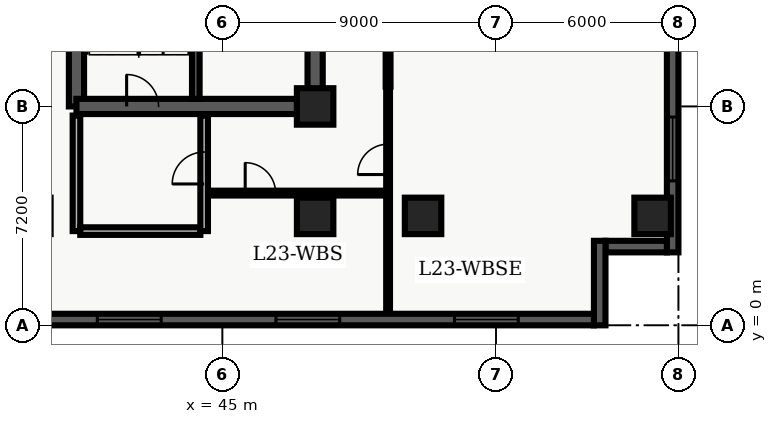
"""IFC4 building model, lengths in metres.
Left out: names, types, materials, properties, quantities, classifications, styles, units other than length and angle.
Written with IfcOpenShell. Run it as: python <this file> out.ifc"""

import sys

from ifc_helpers import new_model, entity, si_unit, converted_unit, direction, frame, origin_with_axes, origin_2d_with_axis, place, context, subcontext, project, spatial, polyline, rectangle, outline, extrude, element, fill, save


model = new_model("IFC4")
c1 = context("Model", 3, precision=1e-05, world=origin_with_axes(), true_north=direction((0.0, 1.0)))
c2 = subcontext(c1, "Body", "Model", "MODEL_VIEW")
j1 = project(units=[si_unit("LENGTHUNIT", "METRE"), converted_unit("PLANEANGLEUNIT", "DEGREE", entity("IfcPlaneAngleMeasure", 0.017), si_unit("PLANEANGLEUNIT", "RADIAN"), dimensions=[0, 0, 0, 0, 0, 0, 0])], contexts=[c1])
p1 = place(None, origin_with_axes())
s1 = spatial("IfcSite", under=j1, at=p1, CompositionType="ELEMENT")
p2 = place(p1, origin_with_axes())
s2 = spatial("IfcBuilding", under=s1, at=p2, CompositionType="ELEMENT")
p3 = place(p2, frame((0.0, 0.0, 96.9), z_axis=(0.0, 0.0, 1.0), x_axis=(1.0, 0.0, 0.0)))
s3 = spatial("IfcBuildingStorey", under=s2, at=p3, CompositionType="ELEMENT", Elevation=96.9)
p4 = place(p3, frame((40.2, 7.2, 0.0), z_axis=(0.0, 0.0, 1.0), x_axis=(0.0, 1.0, 0.0)))
e1 = element("IfcWall", 1, at=p4, inside=s3, PredefinedType="SHEAR", context=c2, shape_type="SweptSolid", body=[
    extrude(outline(polyline([(0.0, -0.25), (15.6, -0.25), (15.6, 0.25), (0.0, 0.25), (0.0, -0.25)])), origin_with_axes(), (0.0, 0.0, 1.0), 3.66),
])
p5 = place(p4, frame((12.75, 0.0, 0.0), z_axis=(0.0, 0.0, 1.0), x_axis=(1.0, 0.0, 0.0)))
e2 = element("IfcOpeningElement", 2, at=p5, cuts=e1, PredefinedType="OPENING", context=c2, shape_type="SweptSolid", body=[
    extrude(rectangle(XDim=1.2, YDim=0.52, at=origin_2d_with_axis()), origin_with_axes(), (0.0, 0.0, 1.0), 2.15),
])
p6 = place(p3, frame((40.2, 7.2, 0.0), z_axis=(0.0, 0.0, 1.0), x_axis=(1.0, 0.0, 0.0)))
e3 = element("IfcWall", 3, at=p6, inside=s3, PredefinedType="SHEAR", context=c2, shape_type="SweptSolid", body=[
    extrude(outline(polyline([(0.0, -0.25), (7.85, -0.25), (7.85, 0.25), (0.0, 0.25), (0.0, -0.25)])), origin_with_axes(), (0.0, 0.0, 1.0), 3.66),
])
p7 = place(p6, frame((2.175, 0.0, 0.0), z_axis=(0.0, 0.0, 1.0), x_axis=(1.0, 0.0, 0.0)))
e4 = element("IfcOpeningElement", 4, at=p7, cuts=e3, PredefinedType="OPENING", context=c2, shape_type="SweptSolid", body=[
    extrude(rectangle(XDim=1.05, YDim=0.52, at=origin_2d_with_axis()), origin_with_axes(), (0.0, 0.0, 1.0), 2.15),
])
p8 = place(p3, frame((48.05, 7.2, 0.0), z_axis=(0.0, 0.0, 1.0), x_axis=(0.0, 1.0, 0.0)))
e5 = element("IfcWall", 5, at=p8, inside=s3, PredefinedType="SHEAR", context=c2, shape_type="SweptSolid", body=[
    extrude(outline(polyline([(0.0, -0.25), (15.6, -0.25), (15.6, 0.25), (0.0, 0.25), (0.0, -0.25)])), origin_with_axes(), (0.0, 0.0, 1.0), 3.66),
])
p9 = place(p8, frame((2.725, 0.0, 0.0), z_axis=(0.0, 0.0, 1.0), x_axis=(1.0, 0.0, 0.0)))
e6 = element("IfcOpeningElement", 6, at=p9, cuts=e5, PredefinedType="OPENING", context=c2, shape_type="SweptSolid", body=[
    extrude(rectangle(XDim=0.95, YDim=0.52, at=origin_2d_with_axis()), origin_with_axes(), (0.0, 0.0, 1.0), 2.15),
])
p10 = place(p8, frame((5.675, 0.0, 0.0), z_axis=(0.0, 0.0, 1.0), x_axis=(1.0, 0.0, 0.0)))
e7 = element("IfcOpeningElement", 7, at=p10, cuts=e5, PredefinedType="OPENING", context=c2, shape_type="SweptSolid", body=[
    extrude(rectangle(XDim=0.95, YDim=0.52, at=origin_2d_with_axis()), origin_with_axes(), (0.0, 0.0, 1.0), 2.15),
])
p11 = place(p3, frame((44.125, 7.45, 0.0), z_axis=(0.0, 0.0, 1.0), x_axis=(0.0, 1.0, 0.0)))
e8 = element("IfcWall", 8, at=p11, inside=s3, PredefinedType="SHEAR", context=c2, shape_type="SweptSolid", body=[
    extrude(outline(polyline([(0.0, -0.125), (15.1, -0.125), (15.1, 0.125), (0.0, 0.125), (0.0, -0.125)])), origin_with_axes(), (0.0, 0.0, 1.0), 3.66),
])
p12 = place(p3, frame((40.2, 3.1, 0.0), z_axis=(0.0, 0.0, 1.0), x_axis=(0.0, 1.0, 0.0)))
e9 = element("IfcWall", 9, at=p12, inside=s3, PredefinedType="SOLIDWALL", context=c2, shape_type="SweptSolid", body=[
    extrude(outline(polyline([(0.0, -0.125), (3.8, -0.125), (3.8, 0.125), (0.0, 0.125), (0.0, -0.125)])), origin_with_axes(), (0.0, 0.0, 1.0), 2.7),
])
p13 = place(p3, frame((40.325, 3.1, 0.0), z_axis=(0.0, 0.0, 1.0), x_axis=(1.0, 0.0, 0.0)))
e10 = element("IfcWall", 10, at=p13, inside=s3, PredefinedType="SOLIDWALL", context=c2, shape_type="SweptSolid", body=[
    extrude(outline(polyline([(0.0, -0.125), (3.95, -0.125), (3.95, 0.125), (0.0, 0.125), (0.0, -0.125)])), origin_with_axes(), (0.0, 0.0, 1.0), 2.7),
])
p14 = place(p3, frame((44.4, 3.1, 0.0), z_axis=(0.0, 0.0, 1.0), x_axis=(0.0, 1.0, 0.0)))
e11 = element("IfcWall", 11, at=p14, inside=s3, PredefinedType="SOLIDWALL", context=c2, shape_type="SweptSolid", body=[
    extrude(outline(polyline([(0.0, -0.125), (3.8, -0.125), (3.8, 0.125), (0.0, 0.125), (0.0, -0.125)])), origin_with_axes(), (0.0, 0.0, 1.0), 2.7),
])
p15 = place(p14, frame((2.075, 0.0, 0.0), z_axis=(0.0, 0.0, 1.0), x_axis=(1.0, 0.0, 0.0)))
e12 = element("IfcOpeningElement", 12, at=p15, cuts=e11, PredefinedType="OPENING", context=c2, shape_type="SweptSolid", body=[
    extrude(rectangle(XDim=1.05, YDim=0.27, at=origin_2d_with_axis()), origin_with_axes(), (0.0, 0.0, 1.0), 2.15),
])
for number, where, z_axis, x_axis in (
    (13, (48.05, 3.6, 0.0), (0.0, 0.0, 1.0), (1.0, 0.0, 0.0)),
    (14, (48.05, 7.2, 0.0), (0.0, 0.0, 1.0), (1.0, 0.0, 0.0)),
    (15, (51.6, 3.6, 0.0), (0.0, 0.0, 1.0), (1.0, 0.0, 0.0)),
    (16, (59.15, 3.6, 0.0), (0.0, 0.0, 1.0), (1.0, 0.0, 0.0)),
):
    element("IfcColumn", number, at=place(p3, frame(where, z_axis=z_axis, x_axis=x_axis)), inside=s3, PredefinedType="COLUMN", context=c2, shape_type="SweptSolid", body=[
        extrude(rectangle(XDim=1.2, YDim=1.2, at=origin_2d_with_axis()), origin_with_axes(), (0.0, 0.0, 1.0), 3.9),
    ])
p16 = place(p3, frame((50.45, 7.85, 0.0), z_axis=(0.0, 0.0, 1.0), x_axis=(0.0, 1.0, 0.0)))
e17 = element("IfcWall", 17, at=p16, inside=s3, PredefinedType="PARTITIONING", context=c2, shape_type="SweptSolid", body=[
    extrude(outline(polyline([(0.0, -0.08), (18.8, -0.08), (18.8, 0.08), (0.0, 0.08), (0.0, -0.08)])), origin_with_axes(), (0.0, 0.0, 1.0), 2.7),
])
p17 = place(p16, frame((5.84, 0.0, 0.0), z_axis=(0.0, 0.0, 1.0), x_axis=(1.0, 0.0, 0.0)))
e18 = element("IfcOpeningElement", 18, at=p17, cuts=e17, PredefinedType="OPENING", context=c2, shape_type="SweptSolid", body=[
    extrude(rectangle(XDim=1.0, YDim=0.18, at=origin_2d_with_axis()), origin_with_axes(), (0.0, 0.0, 1.0), 2.15),
])
p18 = place(p16, frame((11.663, 0.0, 0.0), z_axis=(0.0, 0.0, 1.0), x_axis=(1.0, 0.0, 0.0)))
e19 = element("IfcOpeningElement", 19, at=p18, cuts=e17, PredefinedType="OPENING", context=c2, shape_type="SweptSolid", body=[
    extrude(rectangle(XDim=1.0, YDim=0.18, at=origin_2d_with_axis()), origin_with_axes(), (0.0, 0.0, 1.0), 2.15),
])
p19 = place(p16, frame((14.169, 0.0, 0.0), z_axis=(0.0, 0.0, 1.0), x_axis=(1.0, 0.0, 0.0)))
e20 = element("IfcOpeningElement", 20, at=p19, cuts=e17, PredefinedType="OPENING", context=c2, shape_type="SweptSolid", body=[
    extrude(rectangle(XDim=1.0, YDim=0.18, at=origin_2d_with_axis()), origin_with_axes(), (0.0, 0.0, 1.0), 2.15),
])
p20 = place(p3, frame((44.55, 4.35, 0.0), z_axis=(0.0, 0.0, 1.0), x_axis=(1.0, 0.0, 0.0)))
e21 = element("IfcWall", 21, at=p20, inside=s3, PredefinedType="PARTITIONING", context=c2, shape_type="SweptSolid", body=[
    extrude(outline(polyline([(0.0, -0.08), (5.9, -0.08), (5.9, 0.08), (0.0, 0.08), (0.0, -0.08)])), origin_with_axes(), (0.0, 0.0, 1.0), 2.7),
])
p21 = place(p20, frame((1.7, 0.0, 0.0), z_axis=(0.0, 0.0, 1.0), x_axis=(1.0, 0.0, 0.0)))
e22 = element("IfcOpeningElement", 22, at=p21, cuts=e21, PredefinedType="OPENING", context=c2, shape_type="SweptSolid", body=[
    extrude(rectangle(XDim=1.0, YDim=0.18, at=origin_2d_with_axis()), origin_with_axes(), (0.0, 0.0, 1.0), 2.15),
])
p22 = place(p3, frame((50.45, 0.36, 0.0), z_axis=(0.0, 0.0, 1.0), x_axis=(0.0, 1.0, 0.0)))
e23 = element("IfcWall", 23, at=p22, inside=s3, PredefinedType="PARTITIONING", context=c2, shape_type="SweptSolid", body=[
    extrude(outline(polyline([(0.0, -0.062), (7.49, -0.062), (7.49, 0.062), (0.0, 0.062), (0.0, -0.062)])), origin_with_axes(), (0.0, 0.0, 1.0), 2.7),
])
p23 = place(p22, frame((5.1, 0.0, 0.0), z_axis=(0.0, 0.0, 1.0), x_axis=(1.0, 0.0, 0.0)))
e24 = element("IfcOpeningElement", 24, at=p23, cuts=e23, PredefinedType="OPENING", context=c2, shape_type="SweptSolid", body=[
    extrude(rectangle(XDim=1.0, YDim=0.145, at=origin_2d_with_axis()), origin_with_axes(), (0.0, 0.0, 1.0), 2.15),
])
p24 = place(p3, frame((59.81, 26.02, 0.0), z_axis=(0.0, 0.0, 1.0), x_axis=(0.0, -1.0, 0.0)))
e25 = element("IfcWall", 25, at=p24, inside=s3, PredefinedType="SOLIDWALL", context=c2, shape_type="SweptSolid", body=[
    extrude(outline(polyline([(0.0, -0.19), (23.62, -0.19), (23.62, 0.19), (0.0, 0.19), (0.0, -0.19)])), origin_with_axes(), (0.0, 0.0, 1.0), 3.66),
])
p25 = place(p24, frame((20.218, 0.0, 0.45), z_axis=(0.0, 0.0, 1.0), x_axis=(1.0, 0.0, 0.0)))
e26 = element("IfcOpeningElement", 26, at=p25, cuts=e25, PredefinedType="OPENING", context=c2, shape_type="SweptSolid", body=[
    extrude(rectangle(XDim=2.1, YDim=0.4, at=origin_2d_with_axis()), origin_with_axes(), (0.0, 0.0, 1.0), 2.2),
])
p26 = place(p3, frame((59.62, 2.59, 0.0), z_axis=(0.0, 0.0, 1.0), x_axis=(-1.0, 0.0, 0.0)))
e27 = element("IfcWall", 27, at=p26, inside=s3, PredefinedType="SOLIDWALL", context=c2, shape_type="SweptSolid", body=[
    extrude(outline(polyline([(0.0, -0.19), (2.02, -0.19), (2.02, 0.19), (0.0, 0.19), (0.0, -0.19)])), origin_with_axes(), (0.0, 0.0, 1.0), 3.66),
])
p27 = place(p3, frame((57.41, 2.78, 0.0), z_axis=(0.0, 0.0, 1.0), x_axis=(0.0, -1.0, 0.0)))
e28 = element("IfcWall", 28, at=p27, inside=s3, PredefinedType="SOLIDWALL", context=c2, shape_type="SweptSolid", body=[
    extrude(outline(polyline([(0.0, -0.19), (2.78, -0.19), (2.78, 0.19), (0.0, 0.19), (0.0, -0.19)])), origin_with_axes(), (0.0, 0.0, 1.0), 3.66),
])
p28 = place(p3, frame((57.22, 0.19, 0.0), z_axis=(0.0, 0.0, 1.0), x_axis=(-1.0, 0.0, 0.0)))
e29 = element("IfcWall", 29, at=p28, inside=s3, PredefinedType="SOLIDWALL", context=c2, shape_type="SweptSolid", body=[
    extrude(outline(polyline([(0.0, -0.19), (18.82, -0.19), (18.82, 0.19), (0.0, 0.19), (0.0, -0.19)])), origin_with_axes(), (0.0, 0.0, 1.0), 3.66),
])
p29 = place(p28, frame((3.537, 0.0, 0.45), z_axis=(0.0, 0.0, 1.0), x_axis=(1.0, 0.0, 0.0)))
e30 = element("IfcOpeningElement", 30, at=p29, cuts=e29, PredefinedType="OPENING", context=c2, shape_type="SweptSolid", body=[
    extrude(rectangle(XDim=2.1, YDim=0.4, at=origin_2d_with_axis()), origin_with_axes(), (0.0, 0.0, 1.0), 2.2),
])
p30 = place(p28, frame((9.41, 0.0, 0.45), z_axis=(0.0, 0.0, 1.0), x_axis=(1.0, 0.0, 0.0)))
e31 = element("IfcOpeningElement", 31, at=p30, cuts=e29, PredefinedType="OPENING", context=c2, shape_type="SweptSolid", body=[
    extrude(rectangle(XDim=2.1, YDim=0.4, at=origin_2d_with_axis()), origin_with_axes(), (0.0, 0.0, 1.0), 2.2),
])
p31 = place(p28, frame((15.283, 0.0, 0.45), z_axis=(0.0, 0.0, 1.0), x_axis=(1.0, 0.0, 0.0)))
e32 = element("IfcOpeningElement", 32, at=p31, cuts=e29, PredefinedType="OPENING", context=c2, shape_type="SweptSolid", body=[
    extrude(rectangle(XDim=2.1, YDim=0.4, at=origin_2d_with_axis()), origin_with_axes(), (0.0, 0.0, 1.0), 2.2),
])
p32 = place(p6, frame((2.175, 0.0, 0.0), z_axis=(0.0, 0.0, 1.0), x_axis=(1.0, 0.0, 0.0)))
e33 = element("IfcDoor", 33, at=p32, inside=s3, OperationType="SINGLE_SWING_LEFT", PredefinedType="DOOR", context=c2, shape_type="SweptSolid", body=[
    extrude(rectangle(XDim=1.05, YDim=0.09, at=origin_2d_with_axis()), origin_with_axes(), (0.0, 0.0, 1.0), 2.15),
])
fill(e4, e33)
p33 = place(p14, frame((2.075, 0.0, 0.0), z_axis=(0.0, 0.0, 1.0), x_axis=(1.0, 0.0, 0.0)))
e34 = element("IfcDoor", 34, at=p33, inside=s3, OperationType="SINGLE_SWING_LEFT", PredefinedType="DOOR", context=c2, shape_type="SweptSolid", body=[
    extrude(rectangle(XDim=1.05, YDim=0.09, at=origin_2d_with_axis()), origin_with_axes(), (0.0, 0.0, 1.0), 2.15),
])
fill(e12, e34)
p34 = place(p20, frame((1.7, 0.0, 0.0), z_axis=(0.0, 0.0, 1.0), x_axis=(1.0, 0.0, 0.0)))
e35 = element("IfcDoor", 35, at=p34, inside=s3, OperationType="SINGLE_SWING_LEFT", PredefinedType="DOOR", context=c2, shape_type="SweptSolid", body=[
    extrude(rectangle(XDim=1.0, YDim=0.09, at=origin_2d_with_axis()), origin_with_axes(), (0.0, 0.0, 1.0), 2.15),
])
fill(e22, e35)
p35 = place(p22, frame((5.1, 0.0, 0.0), z_axis=(0.0, 0.0, 1.0), x_axis=(1.0, 0.0, 0.0)))
e36 = element("IfcDoor", 36, at=p35, inside=s3, OperationType="SINGLE_SWING_LEFT", PredefinedType="DOOR", context=c2, shape_type="SweptSolid", body=[
    extrude(rectangle(XDim=1.0, YDim=0.075, at=origin_2d_with_axis()), origin_with_axes(), (0.0, 0.0, 1.0), 2.15),
])
fill(e24, e36)
p36 = place(p24, frame((20.218, 0.0, 0.45), z_axis=(0.0, 0.0, 1.0), x_axis=(1.0, 0.0, 0.0)))
e37 = element("IfcWindow", 37, at=p36, inside=s3, PredefinedType="WINDOW", context=c2, shape_type="SweptSolid", body=[
    extrude(rectangle(XDim=2.1, YDim=0.09, at=origin_2d_with_axis()), origin_with_axes(), (0.0, 0.0, 1.0), 2.2),
])
fill(e26, e37)
p37 = place(p28, frame((3.537, 0.0, 0.45), z_axis=(0.0, 0.0, 1.0), x_axis=(1.0, 0.0, 0.0)))
e38 = element("IfcWindow", 38, at=p37, inside=s3, PredefinedType="WINDOW", context=c2, shape_type="SweptSolid", body=[
    extrude(rectangle(XDim=2.1, YDim=0.09, at=origin_2d_with_axis()), origin_with_axes(), (0.0, 0.0, 1.0), 2.2),
])
fill(e30, e38)
p38 = place(p28, frame((9.41, 0.0, 0.45), z_axis=(0.0, 0.0, 1.0), x_axis=(1.0, 0.0, 0.0)))
e39 = element("IfcWindow", 39, at=p38, inside=s3, PredefinedType="WINDOW", context=c2, shape_type="SweptSolid", body=[
    extrude(rectangle(XDim=2.1, YDim=0.09, at=origin_2d_with_axis()), origin_with_axes(), (0.0, 0.0, 1.0), 2.2),
])
fill(e31, e39)
p39 = place(p28, frame((15.283, 0.0, 0.45), z_axis=(0.0, 0.0, 1.0), x_axis=(1.0, 0.0, 0.0)))
e40 = element("IfcWindow", 40, at=p39, inside=s3, PredefinedType="WINDOW", context=c2, shape_type="SweptSolid", body=[
    extrude(rectangle(XDim=2.1, YDim=0.09, at=origin_2d_with_axis()), origin_with_axes(), (0.0, 0.0, 1.0), 2.2),
])
fill(e32, e40)
save(model, sys.argv[1])
